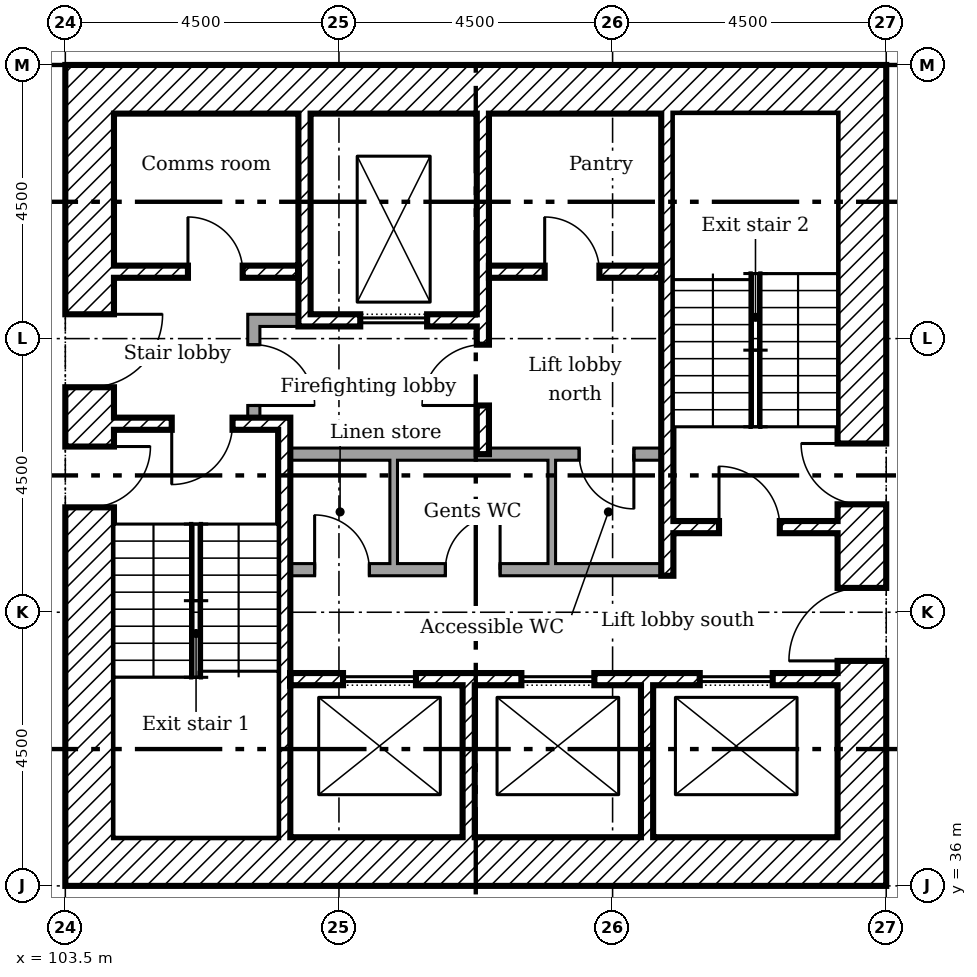
"""IFC4 building model, lengths in metres.
Left out: names, types, materials, properties, quantities, classifications, styles, units other than length and angle.
Written with IfcOpenShell. Run it as: python <this file> out.ifc"""

import sys

from ifc_helpers import new_model, si_unit, direction, frame, frame_2d, origin, place, context, subcontext, project, spatial, rectangle, extrude, element, fill, save


model = new_model("IFC4")
c1 = context("Model", 3, precision=1e-05, world=origin(), true_north=direction((0.0, 1.0)))
c2 = subcontext(c1, "Body", "Model", "MODEL_VIEW")
j1 = project(units=[si_unit("LENGTHUNIT", "METRE"), si_unit("PLANEANGLEUNIT", "RADIAN")], contexts=[c1])
p1 = place(None, origin())
s1 = spatial("IfcSite", under=j1, at=p1, CompositionType="ELEMENT")
p2 = place(p1, origin())
s2 = spatial("IfcBuilding", under=s1, at=p2, CompositionType="ELEMENT")
p3 = place(p2, frame((0.0, 0.0, 69.0)))
s3 = spatial("IfcBuildingStorey", under=s2, at=p3, CompositionType="ELEMENT", Elevation=69.0)
p4 = place(p3, frame((116.6, 36.0, 0.0), z_axis=(0.0, 0.0, 1.0), x_axis=(0.0, 1.0, 0.0)))
e1 = element("IfcWall", 1, at=p4, inside=s3, PredefinedType="SHEAR", context=c2, shape_type="SweptSolid", body=[
    extrude(rectangle(XDim=13.5, YDim=0.8, at=frame_2d((6.75, 0.0))), origin(), (0.0, 0.0, 1.0), 3.35),
])
p5 = place(p4, frame((3.7, 0.0, 0.0)))
e2 = element("IfcOpeningElement", 2, at=p5, cuts=e1, PredefinedType="OPENING", context=c2, shape_type="SweptSolid", body=[
    extrude(rectangle(XDim=1.2, YDim=2.1, at=frame_2d((0.6, 1.05))), frame((0.0, 0.41, 0.0), z_axis=(0.0, -1.0, 0.0), x_axis=(1.0, 0.0, 0.0)), (0.0, 0.0, 1.0), 0.82),
])
p6 = place(p4, frame((6.275, 0.0, 0.0)))
e3 = element("IfcOpeningElement", 3, at=p6, cuts=e1, PredefinedType="OPENING", context=c2, shape_type="SweptSolid", body=[
    extrude(rectangle(XDim=1.0, YDim=2.1, at=frame_2d((0.5, 1.05))), frame((0.0, 0.41, 0.0), z_axis=(0.0, -1.0, 0.0), x_axis=(1.0, 0.0, 0.0)), (0.0, 0.0, 1.0), 0.82),
])
for number, where in (
    (4, (104.3, 49.1, 0.0)),
    (5, (104.3, 36.4, 0.0)),
):
    element("IfcWall", number, at=place(p3, frame(where)), inside=s3, PredefinedType="SHEAR", context=c2, shape_type="SweptSolid", body=[
        extrude(rectangle(XDim=11.9, YDim=0.8, at=frame_2d((5.95, 0.0))), origin(), (0.0, 0.0, 1.0), 3.35),
    ])
p7 = place(p3, frame((103.9, 36.0, 0.0), z_axis=(0.0, 0.0, 1.0), x_axis=(0.0, 1.0, 0.0)))
e6 = element("IfcWall", 6, at=p7, inside=s3, PredefinedType="SHEAR", context=c2, shape_type="SweptSolid", body=[
    extrude(rectangle(XDim=13.5, YDim=0.8, at=frame_2d((6.75, 0.0))), origin(), (0.0, 0.0, 1.0), 3.35),
])
p8 = place(p7, frame((8.2, 0.0, 0.0)))
e7 = element("IfcOpeningElement", 7, at=p8, cuts=e6, PredefinedType="OPENING", context=c2, shape_type="SweptSolid", body=[
    extrude(rectangle(XDim=1.2, YDim=2.1, at=frame_2d((0.6, 1.05))), frame((0.0, 0.41, 0.0), z_axis=(0.0, -1.0, 0.0), x_axis=(1.0, 0.0, 0.0)), (0.0, 0.0, 1.0), 0.82),
])
p9 = place(p7, frame((6.225, 0.0, 0.0)))
e8 = element("IfcOpeningElement", 8, at=p9, cuts=e6, PredefinedType="OPENING", context=c2, shape_type="SweptSolid", body=[
    extrude(rectangle(XDim=1.0, YDim=2.1, at=frame_2d((0.5, 1.05))), frame((0.0, 0.41, 0.0), z_axis=(0.0, -1.0, 0.0), x_axis=(1.0, 0.0, 0.0)), (0.0, 0.0, 1.0), 0.82),
])
p10 = place(p3, frame((107.433, 48.7, 0.0), z_axis=(0.0, 0.0, 1.0), x_axis=(0.0, -1.0, 0.0)))
e9 = element("IfcWall", 9, at=p10, inside=s3, PredefinedType="SHEAR", context=c2, shape_type="SweptSolid", body=[
    extrude(rectangle(XDim=3.5, YDim=0.2, at=frame_2d((1.75, 0.0))), origin(), (0.0, 0.0, 1.0), 3.35),
])
p11 = place(p3, frame((110.367, 48.7, 0.0), z_axis=(0.0, 0.0, 1.0), x_axis=(0.0, -1.0, 0.0)))
e10 = element("IfcWall", 10, at=p11, inside=s3, PredefinedType="SHEAR", context=c2, shape_type="SweptSolid", body=[
    extrude(rectangle(XDim=5.6, YDim=0.2, at=frame_2d((2.8, 0.0))), origin(), (0.0, 0.0, 1.0), 3.35),
])
p12 = place(p11, frame((3.8, 0.0, 0.0)))
e11 = element("IfcOpeningElement", 11, at=p12, cuts=e10, PredefinedType="OPENING", context=c2, shape_type="SweptSolid", body=[
    extrude(rectangle(XDim=1.0, YDim=2.1, at=frame_2d((0.5, 1.05))), frame((0.0, 0.11, 0.0), z_axis=(0.0, -1.0, 0.0), x_axis=(1.0, 0.0, 0.0)), (0.0, 0.0, 1.0), 0.22),
])
for number, where, z_axis, x_axis in (
    (12, (110.133, 36.8, 0.0), (0.0, 0.0, 1.0), (0.0, 1.0, 0.0)),
    (13, (113.067, 36.8, 0.0), (0.0, 0.0, 1.0), (0.0, 1.0, 0.0)),
):
    element("IfcWall", number, at=place(p3, frame(where, z_axis=z_axis, x_axis=x_axis)), inside=s3, PredefinedType="SHEAR", context=c2, shape_type="SweptSolid", body=[
        extrude(rectangle(XDim=2.5, YDim=0.2, at=frame_2d((1.25, 0.0))), origin(), (0.0, 0.0, 1.0), 3.35),
    ])
p13 = place(p3, frame((106.5, 45.3, 0.0)))
e14 = element("IfcWall", 14, at=p13, inside=s3, PredefinedType="PARTITIONING", context=c2, shape_type="SweptSolid", body=[
    extrude(rectangle(XDim=0.833, YDim=0.2, at=frame_2d((0.417, 0.0))), origin(), (0.0, 0.0, 1.0), 3.35),
])
p14 = place(p3, frame((106.6, 43.7, 0.0), z_axis=(0.0, 0.0, 1.0), x_axis=(0.0, 1.0, 0.0)))
e15 = element("IfcWall", 15, at=p14, inside=s3, PredefinedType="PARTITIONING", context=c2, shape_type="SweptSolid", body=[
    extrude(rectangle(XDim=1.5, YDim=0.2, at=frame_2d((0.75, 0.0))), origin(), (0.0, 0.0, 1.0), 3.35),
])
p15 = place(p14, frame((0.2, 0.0, 0.0)))
e16 = element("IfcOpeningElement", 16, at=p15, cuts=e15, PredefinedType="OPENING", context=c2, shape_type="SweptSolid", body=[
    extrude(rectangle(XDim=1.0, YDim=2.1, at=frame_2d((0.5, 1.05))), frame((0.0, 0.11, 0.0), z_axis=(0.0, -1.0, 0.0), x_axis=(1.0, 0.0, 0.0)), (0.0, 0.0, 1.0), 0.22),
])
p16 = place(p3, frame((104.3, 46.1, 0.0)))
e17 = element("IfcWall", 17, at=p16, inside=s3, PredefinedType="SHEAR", context=c2, shape_type="SweptSolid", body=[
    extrude(rectangle(XDim=3.033, YDim=0.2, at=frame_2d((1.517, 0.0))), origin(), (0.0, 0.0, 1.0), 3.35),
])
p17 = place(p16, frame((1.217, 0.0, 0.0)))
e18 = element("IfcOpeningElement", 18, at=p17, cuts=e17, PredefinedType="OPENING", context=c2, shape_type="SweptSolid", body=[
    extrude(rectangle(XDim=0.9, YDim=2.1, at=frame_2d((0.45, 1.05))), frame((0.0, 0.11, 0.0), z_axis=(0.0, -1.0, 0.0), x_axis=(1.0, 0.0, 0.0)), (0.0, 0.0, 1.0), 0.22),
])
p18 = place(p3, frame((110.467, 46.1, 0.0)))
e19 = element("IfcWall", 19, at=p18, inside=s3, PredefinedType="SHEAR", context=c2, shape_type="SweptSolid", body=[
    extrude(rectangle(XDim=2.833, YDim=0.2, at=frame_2d((1.417, 0.0))), origin(), (0.0, 0.0, 1.0), 3.35),
])
p19 = place(p18, frame((0.917, 0.0, 0.0)))
e20 = element("IfcOpeningElement", 20, at=p19, cuts=e19, PredefinedType="OPENING", context=c2, shape_type="SweptSolid", body=[
    extrude(rectangle(XDim=0.9, YDim=2.1, at=frame_2d((0.45, 1.05))), frame((0.0, 0.11, 0.0), z_axis=(0.0, -1.0, 0.0), x_axis=(1.0, 0.0, 0.0)), (0.0, 0.0, 1.0), 0.22),
])
p20 = place(p3, frame((107.533, 45.3, 0.0)))
e21 = element("IfcWall", 21, at=p20, inside=s3, PredefinedType="SHEAR", context=c2, shape_type="SweptSolid", body=[
    extrude(rectangle(XDim=2.733, YDim=0.2, at=frame_2d((1.367, 0.0))), origin(), (0.0, 0.0, 1.0), 3.35),
])
p21 = place(p20, frame((0.817, 0.0, 0.0)))
e22 = element("IfcOpeningElement", 22, at=p21, cuts=e21, PredefinedType="OPENING", context=c2, shape_type="SweptSolid", body=[
    extrude(rectangle(XDim=1.1, YDim=2.1, at=frame_2d((0.55, 1.05))), frame((0.0, 0.11, 0.0), z_axis=(0.0, -1.0, 0.0), x_axis=(1.0, 0.0, 0.0)), (0.0, 0.0, 1.0), 0.22),
])
p22 = place(p3, frame((107.2, 39.4, 0.0)))
e23 = element("IfcWall", 23, at=p22, inside=s3, PredefinedType="SHEAR", context=c2, shape_type="SweptSolid", body=[
    extrude(rectangle(XDim=9.0, YDim=0.2, at=frame_2d((4.5, 0.0))), origin(), (0.0, 0.0, 1.0), 3.35),
])
p23 = place(p22, frame((0.867, 0.0, 0.0)))
e24 = element("IfcOpeningElement", 24, at=p23, cuts=e23, PredefinedType="OPENING", context=c2, shape_type="SweptSolid", body=[
    extrude(rectangle(XDim=1.2, YDim=2.1, at=frame_2d((0.6, 1.05))), frame((0.0, 0.11, 0.0), z_axis=(0.0, -1.0, 0.0), x_axis=(1.0, 0.0, 0.0)), (0.0, 0.0, 1.0), 0.22),
])
p24 = place(p22, frame((3.8, 0.0, 0.0)))
e25 = element("IfcOpeningElement", 25, at=p24, cuts=e23, PredefinedType="OPENING", context=c2, shape_type="SweptSolid", body=[
    extrude(rectangle(XDim=1.2, YDim=2.1, at=frame_2d((0.6, 1.05))), frame((0.0, 0.11, 0.0), z_axis=(0.0, -1.0, 0.0), x_axis=(1.0, 0.0, 0.0)), (0.0, 0.0, 1.0), 0.22),
])
p25 = place(p22, frame((6.733, 0.0, 0.0)))
e26 = element("IfcOpeningElement", 26, at=p25, cuts=e23, PredefinedType="OPENING", context=c2, shape_type="SweptSolid", body=[
    extrude(rectangle(XDim=1.2, YDim=2.1, at=frame_2d((0.6, 1.05))), frame((0.0, 0.11, 0.0), z_axis=(0.0, -1.0, 0.0), x_axis=(1.0, 0.0, 0.0)), (0.0, 0.0, 1.0), 0.22),
])
p26 = place(p3, frame((107.1, 36.8, 0.0), z_axis=(0.0, 0.0, 1.0), x_axis=(0.0, 1.0, 0.0)))
e27 = element("IfcWall", 27, at=p26, inside=s3, PredefinedType="SHEAR", context=c2, shape_type="SweptSolid", body=[
    extrude(rectangle(XDim=6.9, YDim=0.2, at=frame_2d((3.45, 0.0))), origin(), (0.0, 0.0, 1.0), 3.35),
])
p27 = place(p3, frame((104.3, 43.6, 0.0)))
e28 = element("IfcWall", 28, at=p27, inside=s3, PredefinedType="SHEAR", context=c2, shape_type="SweptSolid", body=[
    extrude(rectangle(XDim=2.7, YDim=0.2, at=frame_2d((1.35, 0.0))), origin(), (0.0, 0.0, 1.0), 3.35),
])
p28 = place(p27, frame((0.95, 0.0, 0.0)))
e29 = element("IfcOpeningElement", 29, at=p28, cuts=e28, PredefinedType="OPENING", context=c2, shape_type="SweptSolid", body=[
    extrude(rectangle(XDim=1.0, YDim=2.1, at=frame_2d((0.5, 1.05))), frame((0.0, 0.11, 0.0), z_axis=(0.0, -1.0, 0.0), x_axis=(1.0, 0.0, 0.0)), (0.0, 0.0, 1.0), 0.22),
])
p29 = place(p3, frame((113.5, 41.9, 0.0)))
e30 = element("IfcWall", 30, at=p29, inside=s3, PredefinedType="SHEAR", context=c2, shape_type="SweptSolid", body=[
    extrude(rectangle(XDim=2.7, YDim=0.2, at=frame_2d((1.35, 0.0))), origin(), (0.0, 0.0, 1.0), 3.35),
])
p30 = place(p29, frame((0.75, 0.0, 0.0)))
e31 = element("IfcOpeningElement", 31, at=p30, cuts=e30, PredefinedType="OPENING", context=c2, shape_type="SweptSolid", body=[
    extrude(rectangle(XDim=1.0, YDim=2.1, at=frame_2d((0.5, 1.05))), frame((0.0, 0.11, 0.0), z_axis=(0.0, -1.0, 0.0), x_axis=(1.0, 0.0, 0.0)), (0.0, 0.0, 1.0), 0.22),
])
p31 = place(p3, frame((113.4, 41.1, 0.0), z_axis=(0.0, 0.0, 1.0), x_axis=(0.0, 1.0, 0.0)))
e32 = element("IfcWall", 32, at=p31, inside=s3, PredefinedType="SHEAR", context=c2, shape_type="SweptSolid", body=[
    extrude(rectangle(XDim=7.6, YDim=0.2, at=frame_2d((3.8, 0.0))), origin(), (0.0, 0.0, 1.0), 3.35),
])
p32 = place(p3, frame((107.2, 43.1, 0.0)))
e33 = element("IfcWall", 33, at=p32, inside=s3, PredefinedType="PARTITIONING", context=c2, shape_type="SweptSolid", body=[
    extrude(rectangle(XDim=6.1, YDim=0.2, at=frame_2d((3.05, 0.0))), origin(), (0.0, 0.0, 1.0), 3.35),
])
p33 = place(p32, frame((4.75, 0.0, 0.0)))
e34 = element("IfcOpeningElement", 34, at=p33, cuts=e33, PredefinedType="OPENING", context=c2, shape_type="SweptSolid", body=[
    extrude(rectangle(XDim=0.9, YDim=2.1, at=frame_2d((0.45, 1.05))), frame((0.0, 0.11, 0.0), z_axis=(0.0, -1.0, 0.0), x_axis=(1.0, 0.0, 0.0)), (0.0, 0.0, 1.0), 0.22),
])
p34 = place(p3, frame((107.2, 41.2, 0.0)))
e35 = element("IfcWall", 35, at=p34, inside=s3, PredefinedType="PARTITIONING", context=c2, shape_type="SweptSolid", body=[
    extrude(rectangle(XDim=6.1, YDim=0.2, at=frame_2d((3.05, 0.0))), origin(), (0.0, 0.0, 1.0), 3.35),
])
p35 = place(p34, frame((0.4, 0.0, 0.0)))
e36 = element("IfcOpeningElement", 36, at=p35, cuts=e35, PredefinedType="OPENING", context=c2, shape_type="SweptSolid", body=[
    extrude(rectangle(XDim=0.9, YDim=2.1, at=frame_2d((0.45, 1.05))), frame((0.0, 0.11, 0.0), z_axis=(0.0, -1.0, 0.0), x_axis=(1.0, 0.0, 0.0)), (0.0, 0.0, 1.0), 0.22),
])
p36 = place(p34, frame((2.55, 0.0, 0.0)))
e37 = element("IfcOpeningElement", 37, at=p36, cuts=e35, PredefinedType="OPENING", context=c2, shape_type="SweptSolid", body=[
    extrude(rectangle(XDim=0.9, YDim=2.1, at=frame_2d((0.45, 1.05))), frame((0.0, 0.11, 0.0), z_axis=(0.0, -1.0, 0.0), x_axis=(1.0, 0.0, 0.0)), (0.0, 0.0, 1.0), 0.22),
])
for number, where, z_axis, x_axis in (
    (38, (108.9, 41.3, 0.0), (0.0, 0.0, 1.0), (0.0, 1.0, 0.0)),
    (39, (111.5, 41.3, 0.0), (0.0, 0.0, 1.0), (0.0, 1.0, 0.0)),
):
    element("IfcWall", number, at=place(p3, frame(where, z_axis=z_axis, x_axis=x_axis)), inside=s3, PredefinedType="PARTITIONING", context=c2, shape_type="SweptSolid", body=[
        extrude(rectangle(XDim=1.7, YDim=0.125, at=frame_2d((0.85, 0.0))), origin(), (0.0, 0.0, 1.0), 3.35),
    ])
p37 = place(p8, frame((1.2, 0.0, 0.0), x_axis=(-1.0, 0.0, 0.0)))
e40 = element("IfcDoor", 40, at=p37, inside=s3, OperationType="SINGLE_SWING_RIGHT", PredefinedType="DOOR", context=c2, shape_type="SweptSolid", body=[
    extrude(rectangle(XDim=1.2, YDim=2.1, at=frame_2d((0.6, 1.05))), frame((0.0, 0.025, 0.0), z_axis=(0.0, -1.0, 0.0), x_axis=(1.0, 0.0, 0.0)), (0.0, 0.0, 1.0), 0.05),
])
fill(e7, e40)
p38 = place(p5, origin())
e41 = element("IfcDoor", 41, at=p38, inside=s3, OperationType="SINGLE_SWING_RIGHT", PredefinedType="DOOR", context=c2, shape_type="SweptSolid", body=[
    extrude(rectangle(XDim=1.2, YDim=2.1, at=frame_2d((0.6, 1.05))), frame((0.0, 0.025, 0.0), z_axis=(0.0, -1.0, 0.0), x_axis=(1.0, 0.0, 0.0)), (0.0, 0.0, 1.0), 0.05),
])
fill(e2, e41)
p39 = place(p28, frame((1.0, 0.0, 0.0), x_axis=(-1.0, 0.0, 0.0)))
e42 = element("IfcDoor", 42, at=p39, inside=s3, OperationType="SINGLE_SWING_LEFT", PredefinedType="DOOR", context=c2, shape_type="SweptSolid", body=[
    extrude(rectangle(XDim=1.0, YDim=2.1, at=frame_2d((0.5, 1.05))), frame((0.0, 0.025, 0.0), z_axis=(0.0, -1.0, 0.0), x_axis=(1.0, 0.0, 0.0)), (0.0, 0.0, 1.0), 0.05),
])
fill(e29, e42)
p40 = place(p9, frame((1.0, 0.0, 0.0), x_axis=(-1.0, 0.0, 0.0)))
e43 = element("IfcDoor", 43, at=p40, inside=s3, OperationType="SINGLE_SWING_RIGHT", PredefinedType="DOOR", context=c2, shape_type="SweptSolid", body=[
    extrude(rectangle(XDim=1.0, YDim=2.1, at=frame_2d((0.5, 1.05))), frame((0.0, 0.025, 0.0), z_axis=(0.0, -1.0, 0.0), x_axis=(1.0, 0.0, 0.0)), (0.0, 0.0, 1.0), 0.05),
])
fill(e8, e43)
p41 = place(p30, origin())
e44 = element("IfcDoor", 44, at=p41, inside=s3, OperationType="SINGLE_SWING_RIGHT", PredefinedType="DOOR", context=c2, shape_type="SweptSolid", body=[
    extrude(rectangle(XDim=1.0, YDim=2.1, at=frame_2d((0.5, 1.05))), frame((0.0, 0.025, 0.0), z_axis=(0.0, -1.0, 0.0), x_axis=(1.0, 0.0, 0.0)), (0.0, 0.0, 1.0), 0.05),
])
fill(e31, e44)
p42 = place(p6, origin())
e45 = element("IfcDoor", 45, at=p42, inside=s3, OperationType="SINGLE_SWING_LEFT", PredefinedType="DOOR", context=c2, shape_type="SweptSolid", body=[
    extrude(rectangle(XDim=1.0, YDim=2.1, at=frame_2d((0.5, 1.05))), frame((0.0, 0.025, 0.0), z_axis=(0.0, -1.0, 0.0), x_axis=(1.0, 0.0, 0.0)), (0.0, 0.0, 1.0), 0.05),
])
fill(e3, e45)
p43 = place(p12, frame((1.0, 0.0, 0.0), x_axis=(-1.0, 0.0, 0.0)))
e46 = element("IfcDoor", 46, at=p43, inside=s3, OperationType="SINGLE_SWING_RIGHT", PredefinedType="DOOR", context=c2, shape_type="SweptSolid", body=[
    extrude(rectangle(XDim=1.0, YDim=2.1, at=frame_2d((0.5, 1.05))), frame((0.0, 0.025, 0.0), z_axis=(0.0, -1.0, 0.0), x_axis=(1.0, 0.0, 0.0)), (0.0, 0.0, 1.0), 0.05),
])
fill(e11, e46)
p44 = place(p15, frame((1.0, 0.0, 0.0), x_axis=(-1.0, 0.0, 0.0)))
e47 = element("IfcDoor", 47, at=p44, inside=s3, OperationType="SINGLE_SWING_LEFT", PredefinedType="DOOR", context=c2, shape_type="SweptSolid", body=[
    extrude(rectangle(XDim=1.0, YDim=2.1, at=frame_2d((0.5, 1.05))), frame((0.0, 0.025, 0.0), z_axis=(0.0, -1.0, 0.0), x_axis=(1.0, 0.0, 0.0)), (0.0, 0.0, 1.0), 0.05),
])
fill(e16, e47)
p45 = place(p17, origin())
e48 = element("IfcDoor", 48, at=p45, inside=s3, OperationType="SINGLE_SWING_RIGHT", PredefinedType="DOOR", context=c2, shape_type="SweptSolid", body=[
    extrude(rectangle(XDim=0.9, YDim=2.1, at=frame_2d((0.45, 1.05))), frame((0.0, 0.025, 0.0), z_axis=(0.0, -1.0, 0.0), x_axis=(1.0, 0.0, 0.0)), (0.0, 0.0, 1.0), 0.05),
])
fill(e18, e48)
p46 = place(p19, origin())
e49 = element("IfcDoor", 49, at=p46, inside=s3, OperationType="SINGLE_SWING_RIGHT", PredefinedType="DOOR", context=c2, shape_type="SweptSolid", body=[
    extrude(rectangle(XDim=0.9, YDim=2.1, at=frame_2d((0.45, 1.05))), frame((0.0, 0.025, 0.0), z_axis=(0.0, -1.0, 0.0), x_axis=(1.0, 0.0, 0.0)), (0.0, 0.0, 1.0), 0.05),
])
fill(e20, e49)
p47 = place(p35, origin())
e50 = element("IfcDoor", 50, at=p47, inside=s3, OperationType="SINGLE_SWING_RIGHT", PredefinedType="DOOR", context=c2, shape_type="SweptSolid", body=[
    extrude(rectangle(XDim=0.9, YDim=2.1, at=frame_2d((0.45, 1.05))), frame((0.0, 0.025, 0.0), z_axis=(0.0, -1.0, 0.0), x_axis=(1.0, 0.0, 0.0)), (0.0, 0.0, 1.0), 0.05),
])
fill(e36, e50)
p48 = place(p36, origin())
e51 = element("IfcDoor", 51, at=p48, inside=s3, OperationType="SINGLE_SWING_LEFT", PredefinedType="DOOR", context=c2, shape_type="SweptSolid", body=[
    extrude(rectangle(XDim=0.9, YDim=2.1, at=frame_2d((0.45, 1.05))), frame((0.0, 0.025, 0.0), z_axis=(0.0, -1.0, 0.0), x_axis=(1.0, 0.0, 0.0)), (0.0, 0.0, 1.0), 0.05),
])
fill(e37, e51)
p49 = place(p33, frame((0.9, 0.0, 0.0), x_axis=(-1.0, 0.0, 0.0)))
e52 = element("IfcDoor", 52, at=p49, inside=s3, OperationType="SINGLE_SWING_RIGHT", PredefinedType="DOOR", context=c2, shape_type="SweptSolid", body=[
    extrude(rectangle(XDim=0.9, YDim=2.1, at=frame_2d((0.45, 1.05))), frame((0.0, 0.025, 0.0), z_axis=(0.0, -1.0, 0.0), x_axis=(1.0, 0.0, 0.0)), (0.0, 0.0, 1.0), 0.05),
])
fill(e34, e52)
p50 = place(p21, origin())
e53 = element("IfcDoor", 53, at=p50, inside=s3, OperationType="SLIDING_TO_LEFT", PredefinedType="DOOR", context=c2, shape_type="SweptSolid", body=[
    extrude(rectangle(XDim=1.1, YDim=2.1, at=frame_2d((0.55, 1.05))), frame((0.0, 0.025, 0.0), z_axis=(0.0, -1.0, 0.0), x_axis=(1.0, 0.0, 0.0)), (0.0, 0.0, 1.0), 0.05),
])
fill(e22, e53)
p51 = place(p23, origin())
e54 = element("IfcDoor", 54, at=p51, inside=s3, OperationType="SLIDING_TO_LEFT", PredefinedType="DOOR", context=c2, shape_type="SweptSolid", body=[
    extrude(rectangle(XDim=1.2, YDim=2.1, at=frame_2d((0.6, 1.05))), frame((0.0, 0.025, 0.0), z_axis=(0.0, -1.0, 0.0), x_axis=(1.0, 0.0, 0.0)), (0.0, 0.0, 1.0), 0.05),
])
fill(e24, e54)
p52 = place(p24, origin())
e55 = element("IfcDoor", 55, at=p52, inside=s3, OperationType="SLIDING_TO_LEFT", PredefinedType="DOOR", context=c2, shape_type="SweptSolid", body=[
    extrude(rectangle(XDim=1.2, YDim=2.1, at=frame_2d((0.6, 1.05))), frame((0.0, 0.025, 0.0), z_axis=(0.0, -1.0, 0.0), x_axis=(1.0, 0.0, 0.0)), (0.0, 0.0, 1.0), 0.05),
])
fill(e25, e55)
p53 = place(p25, origin())
e56 = element("IfcDoor", 56, at=p53, inside=s3, OperationType="SLIDING_TO_LEFT", PredefinedType="DOOR", context=c2, shape_type="SweptSolid", body=[
    extrude(rectangle(XDim=1.2, YDim=2.1, at=frame_2d((0.6, 1.05))), frame((0.0, 0.025, 0.0), z_axis=(0.0, -1.0, 0.0), x_axis=(1.0, 0.0, 0.0)), (0.0, 0.0, 1.0), 0.05),
])
fill(e26, e56)
save(model, sys.argv[1])
